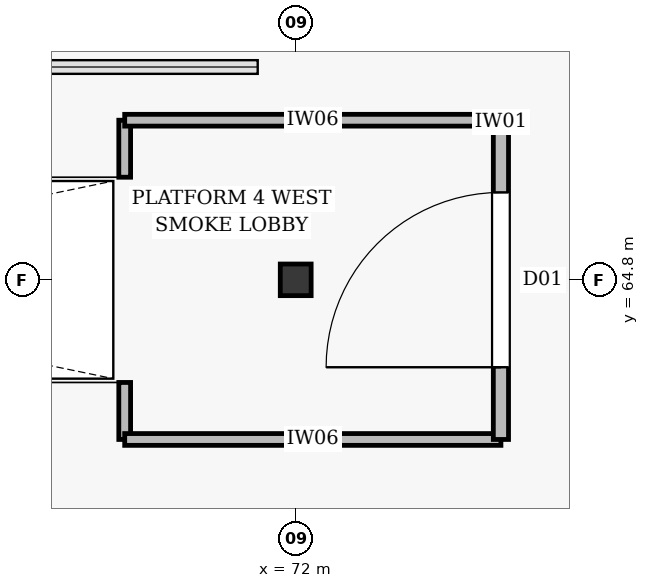
"""IFC4 building model, lengths in metres.
Left out: names, types, materials, properties, quantities, classifications, styles, units other than length and angle.
Written with IfcOpenShell. Run it as: python <this file> out.ifc"""

import sys

from ifc_helpers import new_model, si_unit, direction, frame, frame_2d, origin, origin_2d, place, context, subcontext, project, spatial, rectangle, i_section, extrude, element, fill, save


model = new_model("IFC4")
c1 = context("Model", 3, precision=1e-05, world=origin(), true_north=direction((0.0, 1.0)))
c2 = subcontext(c1, "Body", "Model", "MODEL_VIEW")
j1 = project(units=[si_unit("LENGTHUNIT", "METRE"), si_unit("PLANEANGLEUNIT", "RADIAN")], contexts=[c1])
p1 = place(None, origin())
s1 = spatial("IfcSite", under=j1, at=p1, CompositionType="ELEMENT")
p2 = place(p1, origin())
s2 = spatial("IfcBuilding", under=s1, at=p2, CompositionType="ELEMENT")
p3 = place(p2, frame((0.0, 0.0, 6.6)))
s3 = spatial("IfcBuildingStorey", under=s2, at=p3, CompositionType="ELEMENT", Elevation=6.6)
p4 = place(p3, frame((72.0, 64.8, 0.0), z_axis=(0.0, 0.0, 1.0), x_axis=(1.0, 0.0, 0.0)))
e1 = element("IfcColumn", 1, at=p4, inside=s3, PredefinedType="COLUMN", context=c2, shape_type="SweptSolid", body=[
    extrude(i_section(OverallWidth=0.406, OverallDepth=0.416, WebThickness=0.023, FlangeThickness=0.035, at=origin_2d()), origin(), (0.0, 0.0, 1.0), 6.0),
])
for number, where, z_axis, x_axis in (
    (2, (69.75, 62.7, 0.0), (0.0, 0.0, 1.0), (0.0, 1.0, 0.0)),
    (3, (69.75, 66.15, 0.0), (0.0, 0.0, 1.0), (0.0, 1.0, 0.0)),
):
    element("IfcWall", number, at=place(p3, frame(where, z_axis=z_axis, x_axis=x_axis)), inside=s3, PredefinedType="PARTITIONING", context=c2, shape_type="SweptSolid", body=[
        extrude(rectangle(XDim=0.75, YDim=0.155, at=frame_2d((0.375, 0.0))), origin(), (0.0, 0.0, 1.0), 2.62),
    ])
for number, where, z_axis, x_axis in (
    (4, (69.75, 62.7, 0.0), (0.0, 0.0, 1.0), (1.0, 0.0, 0.0)),
    (5, (69.75, 66.9, 0.0), (0.0, 0.0, 1.0), (1.0, 0.0, 0.0)),
):
    element("IfcWall", number, at=place(p3, frame(where, z_axis=z_axis, x_axis=x_axis)), inside=s3, PredefinedType="PARTITIONING", context=c2, shape_type="SweptSolid", body=[
        extrude(rectangle(XDim=4.95, YDim=0.155, at=frame_2d((2.475, 0.0))), origin(), (0.0, 0.0, 1.0), 2.62),
    ])
p5 = place(p3, frame((74.7, 62.7, 0.0), z_axis=(0.0, 0.0, 1.0), x_axis=(0.0, 1.0, 0.0)))
e6 = element("IfcWall", 6, at=p5, inside=s3, PredefinedType="PARTITIONING", context=c2, shape_type="SweptSolid", body=[
    extrude(rectangle(XDim=4.2, YDim=0.2, at=frame_2d((2.1, 0.0))), origin(), (0.0, 0.0, 1.0), 2.62),
])
p6 = place(p5, frame((0.95, 0.0, 0.005)))
e7 = element("IfcOpeningElement", 7, at=p6, cuts=e6, PredefinedType="OPENING", context=c2, shape_type="SweptSolid", body=[
    extrude(rectangle(XDim=2.3, YDim=2.4, at=frame_2d((1.15, 1.2))), frame((0.0, 0.112, 0.0), z_axis=(0.0, -1.0, 0.0), x_axis=(1.0, 0.0, 0.0)), (0.0, 0.0, 1.0), 0.224),
])
p7 = place(p6, origin())
e8 = element("IfcDoor", 8, at=p7, inside=s3, OperationType="DOUBLE_DOOR_SINGLE_SWING", PredefinedType="DOOR", context=c2, shape_type="SweptSolid", body=[
    extrude(rectangle(XDim=2.3, YDim=2.4, at=frame_2d((1.15, 1.2))), frame((0.0, 0.025, 0.0), z_axis=(0.0, -1.0, 0.0), x_axis=(1.0, 0.0, 0.0)), (0.0, 0.0, 1.0), 0.05),
])
fill(e7, e8)
save(model, sys.argv[1])
